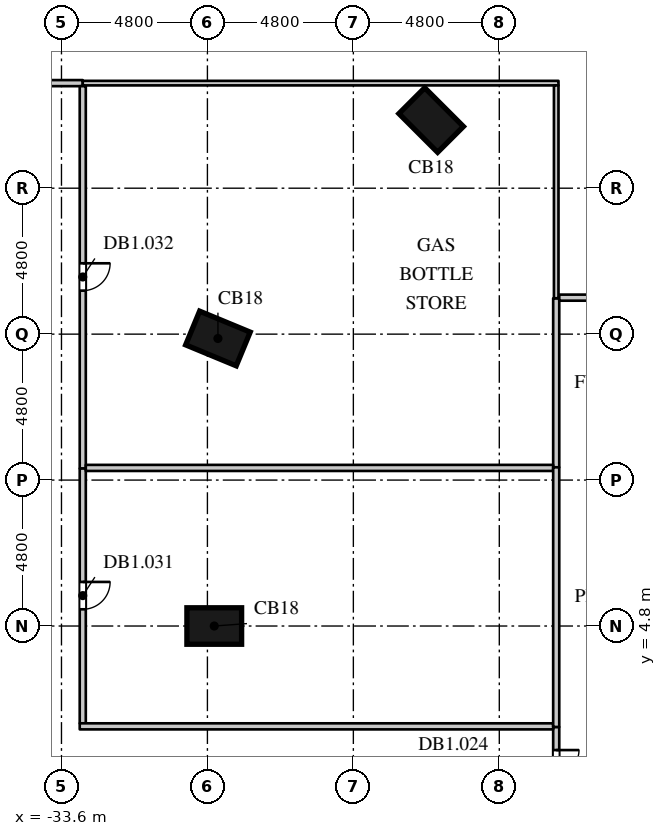
"""IFC4 building model, lengths in metres.
Left out: names, types, materials, properties, quantities, classifications, styles, units other than length and angle.
Written with IfcOpenShell. Run it as: python <this file> out.ifc"""

import sys

from ifc_helpers import new_model, si_unit, direction, frame, frame_2d, origin, origin_2d, place, context, subcontext, project, spatial, polyline, rectangle, outline, extrude, element, fill, save


model = new_model("IFC4")
c1 = context("Model", 3, precision=1e-05, world=origin(), true_north=direction((0.0, 1.0)))
c2 = subcontext(c1, "Body", "Model", "MODEL_VIEW")
j1 = project(units=[si_unit("LENGTHUNIT", "METRE"), si_unit("PLANEANGLEUNIT", "RADIAN")], contexts=[c1])
p1 = place(None, origin())
s1 = spatial("IfcSite", under=j1, at=p1, CompositionType="ELEMENT")
p2 = place(p1, origin())
s2 = spatial("IfcBuilding", under=s1, at=p2, CompositionType="ELEMENT")
p3 = place(p2, frame((0.0, 0.0, -4.5)))
s3 = spatial("IfcBuildingStorey", under=s2, at=p3, CompositionType="ELEMENT", Elevation=-4.5)
p4 = place(p3, origin())
e1 = element("IfcWall", 1, at=p4, inside=s3, PredefinedType="SOLIDWALL", context=c2, shape_type="SweptSolid", body=[
    extrude(outline(polyline([(-23.513, 50.8), (-50.8, 23.513), (-50.2, 23.264), (-23.264, 50.2), (-23.513, 50.8)])), origin(), (0.0, 0.0, 1.0), 4.5),
])
for number, where, z_axis, x_axis in (
    (2, (-28.575, 4.8, 0.0), (0.0, 0.0, 1.0), (0.0, -1.0, 0.0)),
    (3, (-28.454, 14.257, 0.0), (0.0, 0.0, 1.0), (-0.383, -0.924, 0.0)),
    (4, (-21.441, 21.441, 0.0), (0.0, 0.0, 1.0), (-0.707, -0.707, 0.0)),
):
    element("IfcColumn", number, at=place(p3, frame(where, z_axis=z_axis, x_axis=x_axis)), inside=s3, PredefinedType="COLUMN", context=c2, shape_type="SweptSolid", body=[
        extrude(rectangle(XDim=1.2, YDim=1.8, at=origin_2d()), origin(), (0.0, 0.0, 1.0), 4.5),
    ])
p5 = place(p3, frame((-36.5, 22.656, 0.0), z_axis=(0.0, 0.0, 1.0), x_axis=(1.0, 0.0, 0.0)))
e5 = element("IfcWall", 5, at=p5, inside=s3, PredefinedType="PARTITIONING", context=c2, shape_type="SweptSolid", body=[
    extrude(rectangle(XDim=3.6, YDim=0.2, at=frame_2d((1.8, 0.0))), origin(), (0.0, 0.0, 1.0), 4.048),
])
p6 = place(p3, frame((-32.9, 9.98, 0.0), z_axis=(0.0, 0.0, 1.0), x_axis=(0.0, 1.0, 0.0)))
e6 = element("IfcWall", 6, at=p6, inside=s3, PredefinedType="PARTITIONING", context=c2, shape_type="SweptSolid", body=[
    extrude(rectangle(XDim=12.576, YDim=0.2, at=frame_2d((6.288, 0.0))), origin(), (0.0, 0.0, 1.0), 4.048),
])
p7 = place(p6, frame((5.85, 0.0, 0.0)))
e7 = element("IfcOpeningElement", 7, at=p7, cuts=e6, PredefinedType="OPENING", context=c2, shape_type="SweptSolid", body=[
    extrude(rectangle(XDim=0.9, YDim=2.2, at=frame_2d((0.45, 1.1))), frame((0.0, 0.11, 0.0), z_axis=(0.0, -1.0, 0.0), x_axis=(1.0, 0.0, 0.0)), (0.0, 0.0, 1.0), 0.22),
])
p8 = place(p3, frame((-17.328, -1.48, 0.0), z_axis=(0.0, 0.0, 1.0), x_axis=(0.0, 1.0, 0.0)))
e8 = element("IfcWall", 8, at=p8, inside=s3, PredefinedType="PARTITIONING", context=c2, shape_type="SweptSolid", body=[
    extrude(rectangle(XDim=2.96, YDim=0.2, at=frame_2d((1.48, 0.0))), origin(), (0.0, 0.0, 1.0), 4.048),
])
p9 = place(p8, frame((0.7, 0.0, 0.0)))
e9 = element("IfcOpeningElement", 9, at=p9, cuts=e8, PredefinedType="OPENING", context=c2, shape_type="SweptSolid", body=[
    extrude(rectangle(XDim=1.5, YDim=2.4, at=frame_2d((0.75, 1.2))), frame((0.0, 0.11, 0.0), z_axis=(0.0, -1.0, 0.0), x_axis=(1.0, 0.0, 0.0)), (0.0, 0.0, 1.0), 0.22),
])
p10 = place(p3, frame((-17.328, 10.02, 0.0), z_axis=(0.0, 0.0, 1.0), x_axis=(0.0, 1.0, 0.0)))
e10 = element("IfcWall", 10, at=p10, inside=s3, PredefinedType="PARTITIONING", context=c2, shape_type="SweptSolid", body=[
    extrude(rectangle(XDim=5.56, YDim=0.2, at=frame_2d((2.78, 0.0))), origin(), (0.0, 0.0, 1.0), 4.048),
])
p11 = place(p3, frame((-17.228, 15.6, 0.0), z_axis=(0.0, 0.0, 1.0), x_axis=(1.0, 0.0, 0.0)))
e11 = element("IfcWall", 11, at=p11, inside=s3, PredefinedType="PARTITIONING", context=c2, shape_type="SweptSolid", body=[
    extrude(rectangle(XDim=34.656, YDim=0.2, at=frame_2d((17.328, 0.0))), origin(), (0.0, 0.0, 1.0), 4.048),
])
p12 = place(p3, frame((-32.9, 22.656, 0.0), z_axis=(0.0, 0.0, 1.0), x_axis=(1.0, 0.0, 0.0)))
e12 = element("IfcWall", 12, at=p12, inside=s3, PredefinedType="PARTITIONING", context=c2, shape_type="SweptSolid", body=[
    extrude(rectangle(XDim=15.647, YDim=0.15, at=frame_2d((7.823, 0.0))), origin(), (0.0, 0.0, 1.0), 4.048),
])
p13 = place(p3, frame((-17.328, 15.58, 0.0), z_axis=(0.0, 0.0, 1.0), x_axis=(0.0, 1.0, 0.0)))
e13 = element("IfcWall", 13, at=p13, inside=s3, PredefinedType="PARTITIONING", context=c2, shape_type="SweptSolid", body=[
    extrude(rectangle(XDim=7.001, YDim=0.15, at=frame_2d((3.5, 0.0))), origin(), (0.0, 0.0, 1.0), 4.048),
])
p14 = place(p3, frame((-32.9, 1.6, 0.0), z_axis=(0.0, 0.0, 1.0), x_axis=(0.0, 1.0, 0.0)))
e14 = element("IfcWall", 14, at=p14, inside=s3, PredefinedType="PARTITIONING", context=c2, shape_type="SweptSolid", body=[
    extrude(rectangle(XDim=8.38, YDim=0.2, at=frame_2d((4.19, 0.0))), origin(), (0.0, 0.0, 1.0), 4.048),
])
p15 = place(p14, frame((3.75, 0.0, 0.0)))
e15 = element("IfcOpeningElement", 15, at=p15, cuts=e14, PredefinedType="OPENING", context=c2, shape_type="SweptSolid", body=[
    extrude(rectangle(XDim=0.9, YDim=2.2, at=frame_2d((0.45, 1.1))), frame((0.0, 0.11, 0.0), z_axis=(0.0, -1.0, 0.0), x_axis=(1.0, 0.0, 0.0)), (0.0, 0.0, 1.0), 0.22),
])
p16 = place(p3, frame((-33.0, 1.5, 0.0), z_axis=(0.0, 0.0, 1.0), x_axis=(1.0, 0.0, 0.0)))
e16 = element("IfcWall", 16, at=p16, inside=s3, PredefinedType="PARTITIONING", context=c2, shape_type="SweptSolid", body=[
    extrude(rectangle(XDim=15.572, YDim=0.2, at=frame_2d((7.786, 0.0))), origin(), (0.0, 0.0, 1.0), 4.048),
])
p17 = place(p3, frame((-32.8, 10.0, 0.0), z_axis=(0.0, 0.0, 1.0), x_axis=(1.0, 0.0, 0.0)))
e17 = element("IfcWall", 17, at=p17, inside=s3, PredefinedType="PARTITIONING", context=c2, shape_type="SweptSolid", body=[
    extrude(rectangle(XDim=15.372, YDim=0.2, at=frame_2d((7.686, 0.0))), origin(), (0.0, 0.0, 1.0), 4.048),
])
p18 = place(p3, frame((-17.328, 1.48, 0.0), z_axis=(0.0, 0.0, 1.0), x_axis=(0.0, 1.0, 0.0)))
e18 = element("IfcWall", 18, at=p18, inside=s3, PredefinedType="PARTITIONING", context=c2, shape_type="SweptSolid", body=[
    extrude(rectangle(XDim=8.54, YDim=0.2, at=frame_2d((4.27, 0.0))), origin(), (0.0, 0.0, 1.0), 4.048),
])
p19 = place(p9, origin())
e19 = element("IfcDoor", 19, at=p19, inside=s3, OperationType="DOUBLE_DOOR_SINGLE_SWING", PredefinedType="DOOR", context=c2, shape_type="SweptSolid", body=[
    extrude(rectangle(XDim=1.5, YDim=2.4, at=frame_2d((0.75, 1.2))), frame((0.0, 0.025, 0.0), z_axis=(0.0, -1.0, 0.0), x_axis=(1.0, 0.0, 0.0)), (0.0, 0.0, 1.0), 0.05),
])
fill(e9, e19)
p20 = place(p15, origin())
e20 = element("IfcDoor", 20, at=p20, inside=s3, OperationType="SINGLE_SWING_LEFT", PredefinedType="DOOR", context=c2, shape_type="SweptSolid", body=[
    extrude(rectangle(XDim=0.9, YDim=2.2, at=frame_2d((0.45, 1.1))), frame((0.0, 0.025, 0.0), z_axis=(0.0, -1.0, 0.0), x_axis=(1.0, 0.0, 0.0)), (0.0, 0.0, 1.0), 0.05),
])
fill(e15, e20)
p21 = place(p7, origin())
e21 = element("IfcDoor", 21, at=p21, inside=s3, OperationType="SINGLE_SWING_LEFT", PredefinedType="DOOR", context=c2, shape_type="SweptSolid", body=[
    extrude(rectangle(XDim=0.9, YDim=2.2, at=frame_2d((0.45, 1.1))), frame((0.0, 0.025, 0.0), z_axis=(0.0, -1.0, 0.0), x_axis=(1.0, 0.0, 0.0)), (0.0, 0.0, 1.0), 0.05),
])
fill(e7, e21)
save(model, sys.argv[1])
